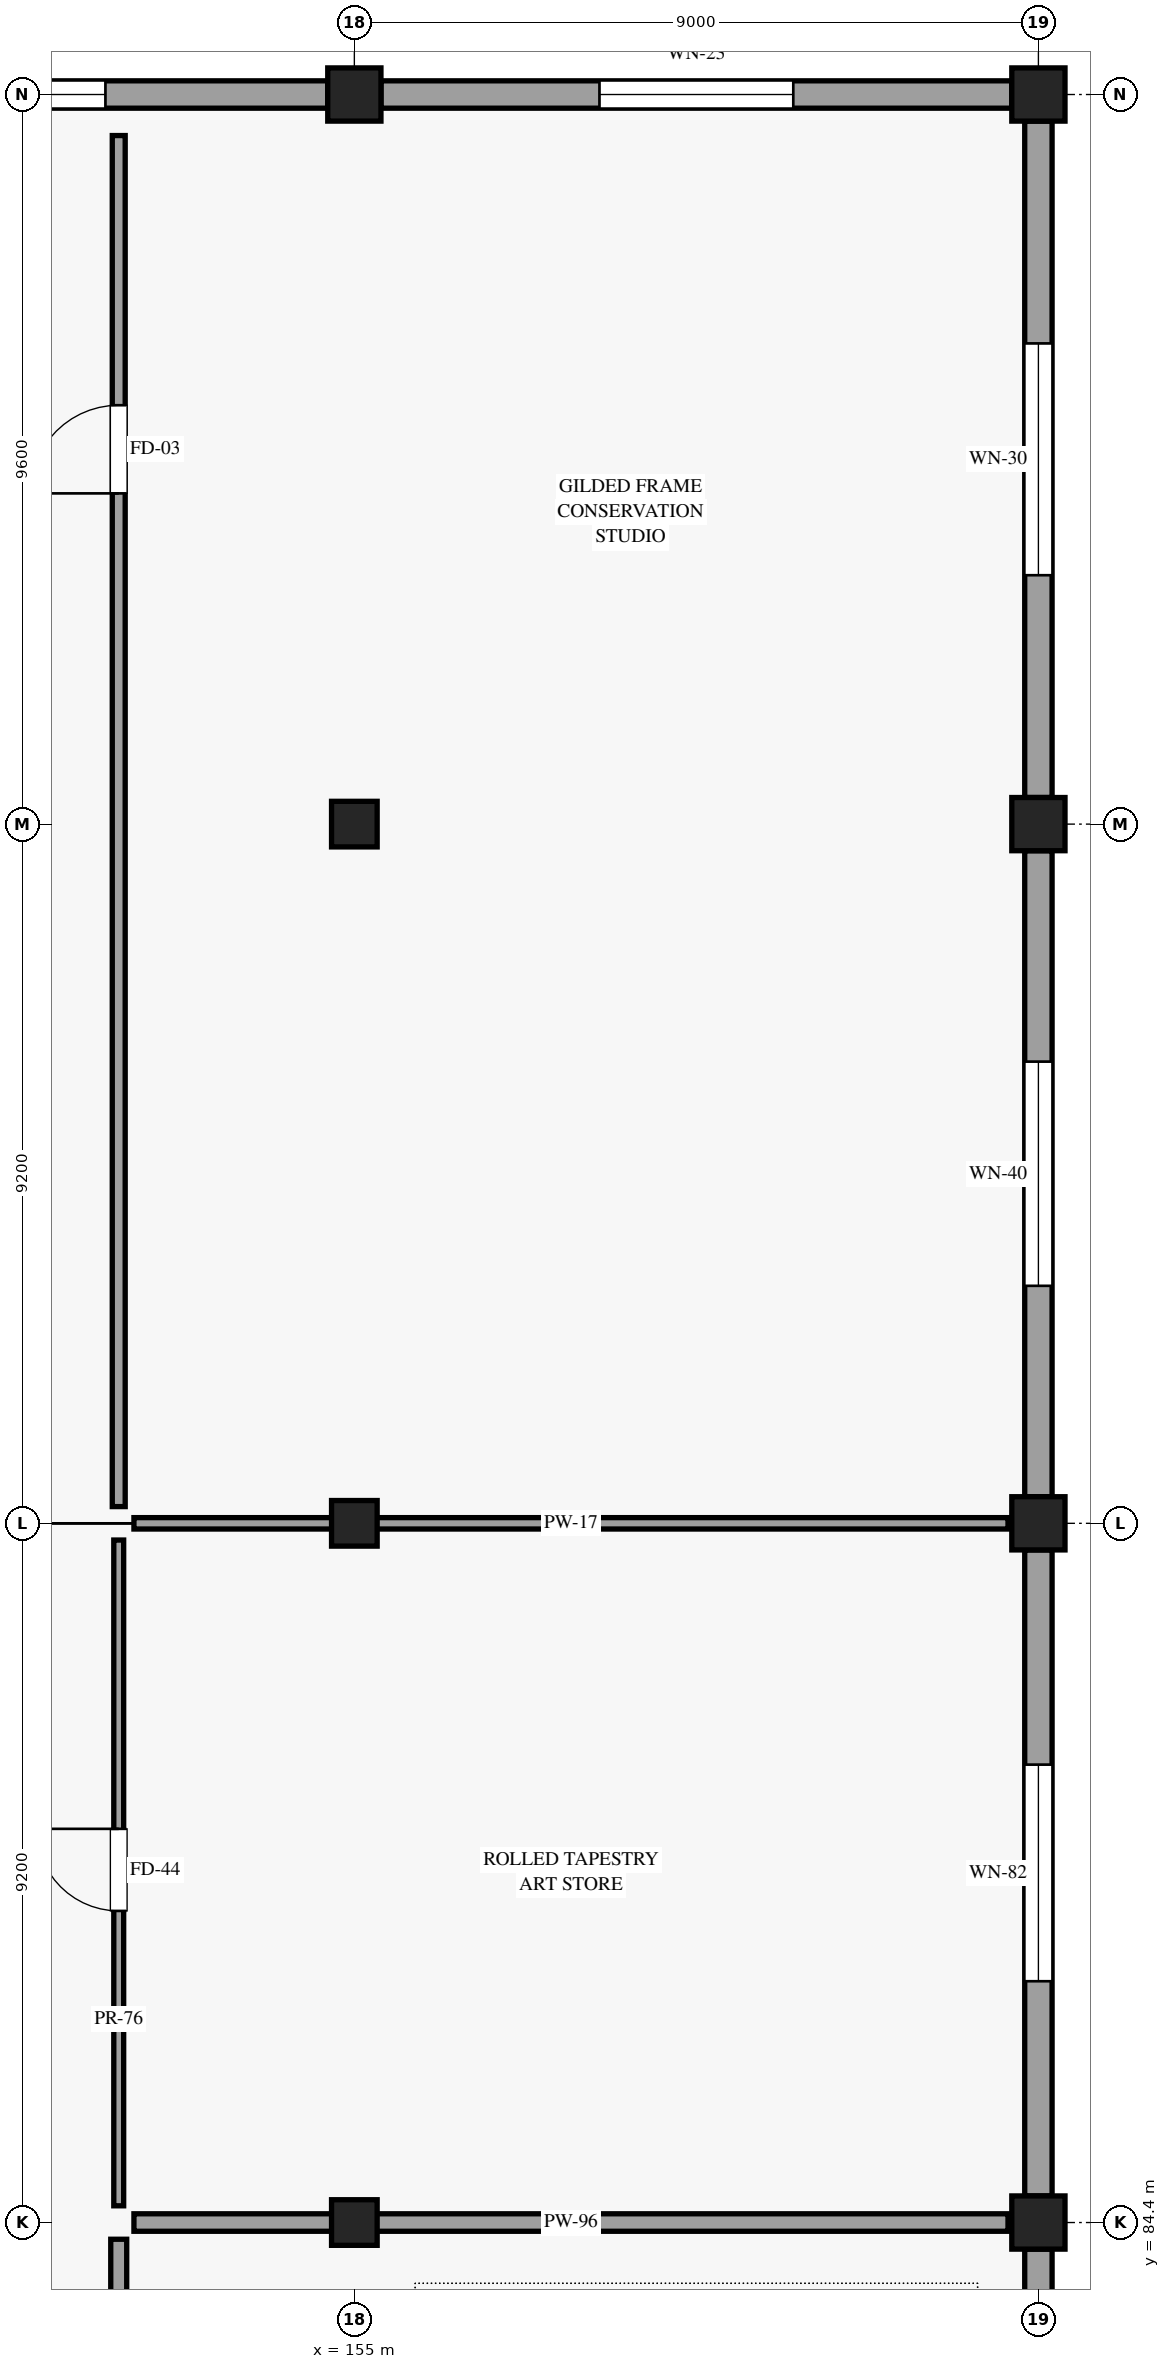
"""IFC4 building model, lengths in metres.
Left out: names, types, materials, properties, quantities, classifications, styles, units other than length and angle.
Written with IfcOpenShell. Run it as: python <this file> out.ifc"""

import sys

from ifc_helpers import new_model, si_unit, direction, frame, frame_2d, origin, origin_2d, place, context, subcontext, project, spatial, rectangle, extrude, element, fill, save


model = new_model("IFC4")
c1 = context("Model", 3, precision=1e-05, world=origin(), true_north=direction((0.0, 1.0)))
c2 = subcontext(c1, "Body", "Model", "MODEL_VIEW")
j1 = project(units=[si_unit("LENGTHUNIT", "METRE"), si_unit("PLANEANGLEUNIT", "RADIAN")], contexts=[c1])
p1 = place(None, origin())
s1 = spatial("IfcSite", under=j1, at=p1, CompositionType="ELEMENT")
p2 = place(p1, origin())
s2 = spatial("IfcBuilding", under=s1, at=p2, CompositionType="ELEMENT")
p3 = place(p2, frame((0.0, 0.0, 10.2)))
s3 = spatial("IfcBuildingStorey", under=s2, at=p3, CompositionType="ELEMENT", Elevation=10.2)
for number, where, z_axis, x_axis in (
    (1, (155.0, 84.4, 0.0), (0.0, 0.0, 1.0), (1.0, 0.0, 0.0)),
    (2, (155.0, 93.6, 0.0), (0.0, 0.0, 1.0), (1.0, 0.0, 0.0)),
    (3, (155.0, 102.8, 0.0), (0.0, 0.0, 1.0), (1.0, 0.0, 0.0)),
):
    element("IfcColumn", number, at=place(p3, frame(where, z_axis=z_axis, x_axis=x_axis)), inside=s3, PredefinedType="COLUMN", context=c2, shape_type="SweptSolid", body=[
        extrude(rectangle(XDim=0.6, YDim=0.6, at=origin_2d()), origin(), (0.0, 0.0, 1.0), 4.8),
    ])
for number, where, z_axis, x_axis in (
    (4, (155.0, 112.4, 0.0), (0.0, 0.0, 1.0), (1.0, 0.0, 0.0)),
    (5, (164.0, 84.4, 0.0), (0.0, 0.0, 1.0), (1.0, 0.0, 0.0)),
    (6, (164.0, 93.6, 0.0), (0.0, 0.0, 1.0), (1.0, 0.0, 0.0)),
    (7, (164.0, 102.8, 0.0), (0.0, 0.0, 1.0), (1.0, 0.0, 0.0)),
    (8, (164.0, 112.4, 0.0), (0.0, 0.0, 1.0), (1.0, 0.0, 0.0)),
):
    element("IfcColumn", number, at=place(p3, frame(where, z_axis=z_axis, x_axis=x_axis)), inside=s3, PredefinedType="COLUMN", context=c2, shape_type="SweptSolid", body=[
        extrude(rectangle(XDim=0.7, YDim=0.7, at=origin_2d()), origin(), (0.0, 0.0, 1.0), 4.8),
    ])
p4 = place(p3, frame((146.35, 112.4, 0.0), z_axis=(0.0, 0.0, 1.0), x_axis=(1.0, 0.0, 0.0)))
e9 = element("IfcWall", 9, at=p4, inside=s3, PredefinedType="STANDARD", context=c2, shape_type="SweptSolid", body=[
    extrude(rectangle(XDim=8.3, YDim=0.36, at=frame_2d((4.15, 0.0))), origin(), (0.0, 0.0, 1.0), 3.715),
])
p5 = place(p4, frame((2.925, 0.0, 0.85)))
e10 = element("IfcOpeningElement", 10, at=p5, cuts=e9, PredefinedType="OPENING", context=c2, shape_type="SweptSolid", body=[
    extrude(rectangle(XDim=2.45, YDim=2.4, at=frame_2d((1.225, 1.2))), frame((0.0, 0.19, 0.0), z_axis=(0.0, -1.0, 0.0), x_axis=(1.0, 0.0, 0.0)), (0.0, 0.0, 1.0), 0.38),
])
p6 = place(p3, frame((155.35, 112.4, 0.0), z_axis=(0.0, 0.0, 1.0), x_axis=(1.0, 0.0, 0.0)))
e11 = element("IfcWall", 11, at=p6, inside=s3, PredefinedType="STANDARD", context=c2, shape_type="SweptSolid", body=[
    extrude(rectangle(XDim=8.3, YDim=0.36, at=frame_2d((4.15, 0.0))), origin(), (0.0, 0.0, 1.0), 3.715),
])
p7 = place(p6, frame((2.875, 0.0, 0.85)))
e12 = element("IfcOpeningElement", 12, at=p7, cuts=e11, PredefinedType="OPENING", context=c2, shape_type="SweptSolid", body=[
    extrude(rectangle(XDim=2.55, YDim=2.4, at=frame_2d((1.275, 1.2))), frame((0.0, 0.19, 0.0), z_axis=(0.0, -1.0, 0.0), x_axis=(1.0, 0.0, 0.0)), (0.0, 0.0, 1.0), 0.38),
])
p8 = place(p3, frame((164.0, 75.55, 0.0), z_axis=(0.0, 0.0, 1.0), x_axis=(0.0, 1.0, 0.0)))
e13 = element("IfcWall", 13, at=p8, inside=s3, PredefinedType="STANDARD", context=c2, shape_type="SweptSolid", body=[
    extrude(rectangle(XDim=8.5, YDim=0.36, at=frame_2d((4.25, 0.0))), origin(), (0.0, 0.0, 1.0), 3.715),
])
p9 = place(p8, frame((5.625, 0.0, 0.85), z_axis=(0.0, 0.0, 1.0), x_axis=(-1.0, 0.0, 0.0)))
e14 = element("IfcOpeningElement", 14, at=p9, cuts=e13, PredefinedType="OPENING", context=c2, shape_type="SweptSolid", body=[
    extrude(rectangle(XDim=2.75, YDim=2.45, at=frame_2d((1.375, 1.225))), frame((0.0, 0.19, 0.0), z_axis=(0.0, -1.0, 0.0), x_axis=(1.0, 0.0, 0.0)), (0.0, 0.0, 1.0), 0.38),
])
p10 = place(p3, frame((164.0, 84.75, 0.0), z_axis=(0.0, 0.0, 1.0), x_axis=(0.0, 1.0, 0.0)))
e15 = element("IfcWall", 15, at=p10, inside=s3, PredefinedType="STANDARD", context=c2, shape_type="SweptSolid", body=[
    extrude(rectangle(XDim=8.5, YDim=0.36, at=frame_2d((4.25, 0.0))), origin(), (0.0, 0.0, 1.0), 3.715),
])
p11 = place(p10, frame((5.675, 0.0, 0.85), z_axis=(0.0, 0.0, 1.0), x_axis=(-1.0, 0.0, 0.0)))
e16 = element("IfcOpeningElement", 16, at=p11, cuts=e15, PredefinedType="OPENING", context=c2, shape_type="SweptSolid", body=[
    extrude(rectangle(XDim=2.85, YDim=2.5, at=frame_2d((1.425, 1.25))), frame((0.0, 0.19, 0.0), z_axis=(0.0, -1.0, 0.0), x_axis=(1.0, 0.0, 0.0)), (0.0, 0.0, 1.0), 0.38),
])
p12 = place(p3, frame((164.0, 93.95, 0.0), z_axis=(0.0, 0.0, 1.0), x_axis=(0.0, 1.0, 0.0)))
e17 = element("IfcWall", 17, at=p12, inside=s3, PredefinedType="STANDARD", context=c2, shape_type="SweptSolid", body=[
    extrude(rectangle(XDim=8.5, YDim=0.36, at=frame_2d((4.25, 0.0))), origin(), (0.0, 0.0, 1.0), 3.715),
])
p13 = place(p12, frame((5.725, 0.0, 0.85), z_axis=(0.0, 0.0, 1.0), x_axis=(-1.0, 0.0, 0.0)))
e18 = element("IfcOpeningElement", 18, at=p13, cuts=e17, PredefinedType="OPENING", context=c2, shape_type="SweptSolid", body=[
    extrude(rectangle(XDim=2.95, YDim=2.5, at=frame_2d((1.475, 1.25))), frame((0.0, 0.19, 0.0), z_axis=(0.0, -1.0, 0.0), x_axis=(1.0, 0.0, 0.0)), (0.0, 0.0, 1.0), 0.38),
])
p14 = place(p3, frame((164.0, 103.15, 0.0), z_axis=(0.0, 0.0, 1.0), x_axis=(0.0, 1.0, 0.0)))
e19 = element("IfcWall", 19, at=p14, inside=s3, PredefinedType="STANDARD", context=c2, shape_type="SweptSolid", body=[
    extrude(rectangle(XDim=8.9, YDim=0.36, at=frame_2d((4.45, 0.0))), origin(), (0.0, 0.0, 1.0), 3.715),
])
p15 = place(p14, frame((5.975, 0.0, 0.85), z_axis=(0.0, 0.0, 1.0), x_axis=(-1.0, 0.0, 0.0)))
e20 = element("IfcOpeningElement", 20, at=p15, cuts=e19, PredefinedType="OPENING", context=c2, shape_type="SweptSolid", body=[
    extrude(rectangle(XDim=3.05, YDim=2.55, at=frame_2d((1.525, 1.275))), frame((0.0, 0.19, 0.0), z_axis=(0.0, -1.0, 0.0), x_axis=(1.0, 0.0, 0.0)), (0.0, 0.0, 1.0), 0.38),
])
p16 = place(p3, frame((151.9, 75.42, 0.0), z_axis=(0.0, 0.0, 1.0), x_axis=(0.0, 1.0, 0.0)))
e21 = element("IfcWall", 21, at=p16, inside=s3, PredefinedType="PARTITIONING", context=c2, shape_type="SweptSolid", body=[
    extrude(rectangle(XDim=8.76, YDim=0.21, at=frame_2d((4.38, 0.0))), origin(), (0.0, 0.0, 1.0), 3.715),
])
p17 = place(p16, frame((3.88, 0.0, 0.0)))
e22 = element("IfcOpeningElement", 22, at=p17, cuts=e21, PredefinedType="OPENING", context=c2, shape_type="SweptSolid", body=[
    extrude(rectangle(XDim=1.0, YDim=2.2, at=frame_2d((0.5, 1.1))), frame((0.0, 0.115, 0.0), z_axis=(0.0, -1.0, 0.0), x_axis=(1.0, 0.0, 0.0)), (0.0, 0.0, 1.0), 0.23),
])
p18 = place(p3, frame((152.1, 84.4, 0.0), z_axis=(0.0, 0.0, 1.0), x_axis=(1.0, 0.0, 0.0)))
e23 = element("IfcWall", 23, at=p18, inside=s3, PredefinedType="PARTITIONING", context=c2, shape_type="SweptSolid", body=[
    extrude(rectangle(XDim=11.5, YDim=0.23, at=frame_2d((5.75, 0.0))), origin(), (0.0, 0.0, 1.0), 3.715),
])
p19 = place(p3, frame((151.9, 84.62, 0.0), z_axis=(0.0, 0.0, 1.0), x_axis=(0.0, 1.0, 0.0)))
e24 = element("IfcWall", 24, at=p19, inside=s3, PredefinedType="PARTITIONING", context=c2, shape_type="SweptSolid", body=[
    extrude(rectangle(XDim=8.76, YDim=0.13, at=frame_2d((4.38, 0.0))), origin(), (0.0, 0.0, 1.0), 3.715),
])
p20 = place(p19, frame((3.88, 0.0, 0.0)))
e25 = element("IfcOpeningElement", 25, at=p20, cuts=e24, PredefinedType="OPENING", context=c2, shape_type="SweptSolid", body=[
    extrude(rectangle(XDim=1.08, YDim=2.24, at=frame_2d((0.54, 1.12))), frame((0.0, 0.075, 0.0), z_axis=(0.0, -1.0, 0.0), x_axis=(1.0, 0.0, 0.0)), (0.0, 0.0, 1.0), 0.15),
])
p21 = place(p3, frame((152.1, 93.6, 0.0), z_axis=(0.0, 0.0, 1.0), x_axis=(1.0, 0.0, 0.0)))
e26 = element("IfcWall", 26, at=p21, inside=s3, PredefinedType="PARTITIONING", context=c2, shape_type="SweptSolid", body=[
    extrude(rectangle(XDim=11.5, YDim=0.15, at=frame_2d((5.75, 0.0))), origin(), (0.0, 0.0, 1.0), 3.715),
])
p22 = place(p3, frame((151.9, 93.82, 0.0), z_axis=(0.0, 0.0, 1.0), x_axis=(0.0, 1.0, 0.0)))
e27 = element("IfcWall", 27, at=p22, inside=s3, PredefinedType="PARTITIONING", context=c2, shape_type="SweptSolid", body=[
    extrude(rectangle(XDim=18.04, YDim=0.17, at=frame_2d((9.02, 0.0))), origin(), (0.0, 0.0, 1.0), 3.715),
])
p23 = place(p22, frame((13.332, 0.0, 0.0)))
e28 = element("IfcOpeningElement", 28, at=p23, cuts=e27, PredefinedType="OPENING", context=c2, shape_type="SweptSolid", body=[
    extrude(rectangle(XDim=1.16, YDim=2.28, at=frame_2d((0.58, 1.14))), frame((0.0, 0.095, 0.0), z_axis=(0.0, -1.0, 0.0), x_axis=(1.0, 0.0, 0.0)), (0.0, 0.0, 1.0), 0.19),
])
p24 = place(p5, origin())
e29 = element("IfcWindow", 29, at=p24, inside=s3, PartitioningType="SINGLE_PANEL", PredefinedType="WINDOW", context=c2, shape_type="SweptSolid", body=[
    extrude(rectangle(XDim=2.45, YDim=2.4, at=frame_2d((1.225, 1.2))), frame((0.0, 0.03, 0.0), z_axis=(0.0, -1.0, 0.0), x_axis=(1.0, 0.0, 0.0)), (0.0, 0.0, 1.0), 0.06),
])
fill(e10, e29)
p25 = place(p7, origin())
e30 = element("IfcWindow", 30, at=p25, inside=s3, PartitioningType="SINGLE_PANEL", PredefinedType="WINDOW", context=c2, shape_type="SweptSolid", body=[
    extrude(rectangle(XDim=2.55, YDim=2.4, at=frame_2d((1.275, 1.2))), frame((0.0, 0.03, 0.0), z_axis=(0.0, -1.0, 0.0), x_axis=(1.0, 0.0, 0.0)), (0.0, 0.0, 1.0), 0.06),
])
fill(e12, e30)
p26 = place(p11, origin())
e31 = element("IfcWindow", 31, at=p26, inside=s3, PartitioningType="SINGLE_PANEL", PredefinedType="WINDOW", context=c2, shape_type="SweptSolid", body=[
    extrude(rectangle(XDim=2.85, YDim=2.5, at=frame_2d((1.425, 1.25))), frame((0.0, 0.03, 0.0), z_axis=(0.0, -1.0, 0.0), x_axis=(1.0, 0.0, 0.0)), (0.0, 0.0, 1.0), 0.06),
])
fill(e16, e31)
p27 = place(p13, origin())
e32 = element("IfcWindow", 32, at=p27, inside=s3, PartitioningType="SINGLE_PANEL", PredefinedType="WINDOW", context=c2, shape_type="SweptSolid", body=[
    extrude(rectangle(XDim=2.95, YDim=2.5, at=frame_2d((1.475, 1.25))), frame((0.0, 0.03, 0.0), z_axis=(0.0, -1.0, 0.0), x_axis=(1.0, 0.0, 0.0)), (0.0, 0.0, 1.0), 0.06),
])
fill(e18, e32)
p28 = place(p15, origin())
e33 = element("IfcWindow", 33, at=p28, inside=s3, PartitioningType="SINGLE_PANEL", PredefinedType="WINDOW", context=c2, shape_type="SweptSolid", body=[
    extrude(rectangle(XDim=3.05, YDim=2.55, at=frame_2d((1.525, 1.275))), frame((0.0, 0.03, 0.0), z_axis=(0.0, -1.0, 0.0), x_axis=(1.0, 0.0, 0.0)), (0.0, 0.0, 1.0), 0.06),
])
fill(e20, e33)
p29 = place(p20, origin())
e34 = element("IfcDoor", 34, at=p29, inside=s3, OperationType="SINGLE_SWING_RIGHT", PredefinedType="DOOR", context=c2, shape_type="SweptSolid", body=[
    extrude(rectangle(XDim=1.08, YDim=2.24, at=frame_2d((0.54, 1.12))), frame((0.0, 0.025, 0.0), z_axis=(0.0, -1.0, 0.0), x_axis=(1.0, 0.0, 0.0)), (0.0, 0.0, 1.0), 0.05),
])
fill(e25, e34)
p30 = place(p23, origin())
e35 = element("IfcDoor", 35, at=p30, inside=s3, OperationType="SINGLE_SWING_LEFT", PredefinedType="DOOR", context=c2, shape_type="SweptSolid", body=[
    extrude(rectangle(XDim=1.16, YDim=2.28, at=frame_2d((0.58, 1.14))), frame((0.0, 0.025, 0.0), z_axis=(0.0, -1.0, 0.0), x_axis=(1.0, 0.0, 0.0)), (0.0, 0.0, 1.0), 0.05),
])
fill(e28, e35)
save(model, sys.argv[1])
